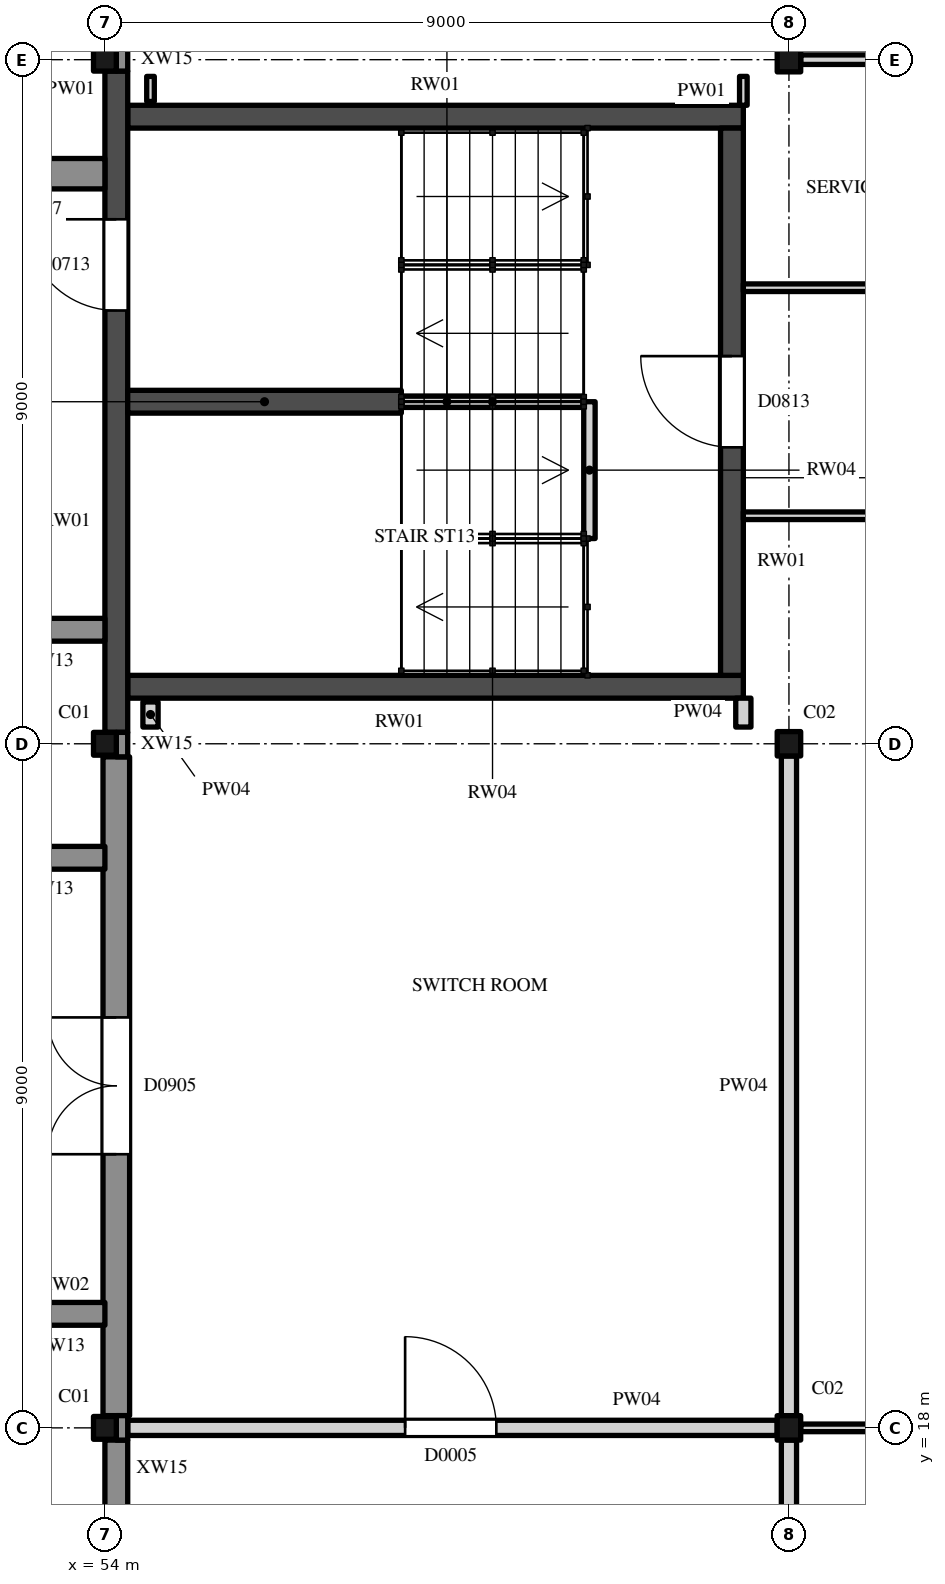
"""IFC4 building model, lengths in metres.
Left out: names, types, materials, properties, quantities, classifications, styles, units other than length and angle.
Written with IfcOpenShell. Run it as: python <this file> out.ifc"""

import sys

from ifc_helpers import new_model, si_unit, direction, frame, frame_2d, origin, origin_2d, place, context, subcontext, project, spatial, polyline, rectangle, hollow_rectangle, i_section, outline, extrude, element, fill, save


model = new_model("IFC4")
c1 = context("Model", 3, precision=1e-05, world=origin(), true_north=direction((0.0, 1.0)))
c2 = subcontext(c1, "Body", "Model", "MODEL_VIEW")
j1 = project(units=[si_unit("LENGTHUNIT", "METRE"), si_unit("PLANEANGLEUNIT", "RADIAN")], contexts=[c1])
p1 = place(None, origin())
s1 = spatial("IfcSite", under=j1, at=p1, CompositionType="ELEMENT")
p2 = place(p1, origin())
s2 = spatial("IfcBuilding", under=s1, at=p2, CompositionType="ELEMENT")
p3 = place(p2, origin())
s3 = spatial("IfcBuildingStorey", under=s2, at=p3, CompositionType="ELEMENT", Elevation=0.0)
p4 = place(p3, frame((54.0, 18.0, 0.0), z_axis=(0.0, 0.0, 1.0), x_axis=(1.0, 0.0, 0.0)))
e1 = element("IfcColumn", 1, at=p4, inside=s3, PredefinedType="COLUMN", context=c2, shape_type="SweptSolid", body=[
    extrude(hollow_rectangle(XDim=0.3, YDim=0.3, WallThickness=0.012, InnerFilletRadius=0.019, OuterFilletRadius=0.031, at=origin_2d()), origin(), (0.0, 0.0, 1.0), 6.0),
])
p5 = place(p3, frame((63.0, 18.0, 0.0), z_axis=(0.0, 0.0, 1.0), x_axis=(1.0, 0.0, 0.0)))
e2 = element("IfcColumn", 2, at=p5, inside=s3, PredefinedType="COLUMN", context=c2, shape_type="SweptSolid", body=[
    extrude(i_section(OverallWidth=0.309, OverallDepth=0.321, WebThickness=0.014, FlangeThickness=0.022, FilletRadius=0.017, at=origin_2d()), origin(), (0.0, 0.0, 1.0), 6.0),
])
p6 = place(p3, frame((54.0, 27.0, 0.0), z_axis=(0.0, 0.0, 1.0), x_axis=(1.0, 0.0, 0.0)))
e3 = element("IfcColumn", 3, at=p6, inside=s3, PredefinedType="COLUMN", context=c2, shape_type="SweptSolid", body=[
    extrude(hollow_rectangle(XDim=0.3, YDim=0.3, WallThickness=0.012, InnerFilletRadius=0.019, OuterFilletRadius=0.031, at=origin_2d()), origin(), (0.0, 0.0, 1.0), 6.0),
])
p7 = place(p3, frame((63.0, 27.0, 0.0), z_axis=(0.0, 0.0, 1.0), x_axis=(1.0, 0.0, 0.0)))
e4 = element("IfcColumn", 4, at=p7, inside=s3, PredefinedType="COLUMN", context=c2, shape_type="SweptSolid", body=[
    extrude(i_section(OverallWidth=0.309, OverallDepth=0.321, WebThickness=0.014, FlangeThickness=0.022, FilletRadius=0.017, at=origin_2d()), origin(), (0.0, 0.0, 1.0), 6.0),
])
p8 = place(p3, frame((54.0, 36.0, 0.0), z_axis=(0.0, 0.0, 1.0), x_axis=(1.0, 0.0, 0.0)))
e5 = element("IfcColumn", 5, at=p8, inside=s3, PredefinedType="COLUMN", context=c2, shape_type="SweptSolid", body=[
    extrude(hollow_rectangle(XDim=0.3, YDim=0.3, WallThickness=0.012, InnerFilletRadius=0.019, OuterFilletRadius=0.031, at=origin_2d()), origin(), (0.0, 0.0, 1.0), 6.0),
])
p9 = place(p3, frame((63.0, 36.0, 0.0), z_axis=(0.0, 0.0, 1.0), x_axis=(1.0, 0.0, 0.0)))
e6 = element("IfcColumn", 6, at=p9, inside=s3, PredefinedType="COLUMN", context=c2, shape_type="SweptSolid", body=[
    extrude(i_section(OverallWidth=0.309, OverallDepth=0.321, WebThickness=0.014, FlangeThickness=0.022, FilletRadius=0.017, at=origin_2d()), origin(), (0.0, 0.0, 1.0), 6.0),
])
for number, where, z_axis, x_axis in (
    (7, (54.3, 27.75, 0.0), (0.0, 0.0, 1.0), (1.0, 0.0, 0.0)),
    (8, (54.3, 35.25, 0.0), (0.0, 0.0, 1.0), (1.0, 0.0, 0.0)),
):
    element("IfcWall", number, at=place(p3, frame(where, z_axis=z_axis, x_axis=x_axis)), inside=s3, PredefinedType="SHEAR", context=c2, shape_type="SweptSolid", body=[
        extrude(rectangle(XDim=8.1, YDim=0.3, at=frame_2d((4.05, 0.0))), origin(), (0.0, 0.0, 1.0), 6.0),
    ])
p10 = place(p3, frame((54.15, 27.15, 0.0), z_axis=(0.0, 0.0, 1.0), x_axis=(0.0, 1.0, 0.0)))
e9 = element("IfcWall", 9, at=p10, inside=s3, PredefinedType="SHEAR", context=c2, shape_type="SweptSolid", body=[
    extrude(rectangle(XDim=8.7, YDim=0.3, at=frame_2d((4.35, 0.0))), origin(), (0.0, 0.0, 1.0), 6.0),
])
p11 = place(p10, frame((5.55, 0.0, 0.0)))
e10 = element("IfcOpeningElement", 10, at=p11, cuts=e9, PredefinedType="OPENING", context=c2, shape_type="SweptSolid", body=[
    extrude(rectangle(XDim=1.2, YDim=2.1, at=frame_2d((0.6, 1.05))), frame((0.0, 0.16, 0.0), z_axis=(0.0, -1.0, 0.0), x_axis=(1.0, 0.0, 0.0)), (0.0, 0.0, 1.0), 0.32),
])
p12 = place(p3, frame((62.25, 27.9, 0.0), z_axis=(0.0, 0.0, 1.0), x_axis=(0.0, 1.0, 0.0)))
e11 = element("IfcWall", 11, at=p12, inside=s3, PredefinedType="SHEAR", context=c2, shape_type="SweptSolid", body=[
    extrude(rectangle(XDim=7.2, YDim=0.3, at=frame_2d((3.6, 0.0))), origin(), (0.0, 0.0, 1.0), 6.0),
])
p13 = place(p12, frame((3.0, 0.0, 0.0)))
e12 = element("IfcOpeningElement", 12, at=p13, cuts=e11, PredefinedType="OPENING", context=c2, shape_type="SweptSolid", body=[
    extrude(rectangle(XDim=1.2, YDim=2.1, at=frame_2d((0.6, 1.05))), frame((0.0, 0.16, 0.0), z_axis=(0.0, -1.0, 0.0), x_axis=(1.0, 0.0, 0.0)), (0.0, 0.0, 1.0), 0.32),
])
p14 = place(p3, frame((57.9, 31.5, 0.0), z_axis=(0.0, 0.0, 1.0), x_axis=(-1.0, 0.0, 0.0)))
e13 = element("IfcWall", 13, at=p14, inside=s3, PredefinedType="SHEAR", context=c2, shape_type="SweptSolid", body=[
    extrude(rectangle(XDim=3.6, YDim=0.3, at=frame_2d((1.8, 0.0))), origin(), (0.0, 0.0, 1.0), 6.0),
])
p15 = place(p3, frame((60.375, 29.7, 0.0), z_axis=(0.0, 0.0, 1.0), x_axis=(0.0, 1.0, 0.0)))
e14 = element("IfcWall", 14, at=p15, inside=s3, PredefinedType="STANDARD", context=c2, shape_type="SweptSolid", body=[
    extrude(rectangle(XDim=1.8, YDim=0.15, at=frame_2d((0.9, 0.0))), origin(), (0.0, 0.0, 1.0), 2.8),
])
p16 = place(p3, frame((60.3, 31.5, 0.0), z_axis=(0.0, 0.0, 1.0), x_axis=(-1.0, 0.0, 0.0)))
e15 = element("IfcWall", 15, at=p16, inside=s3, PredefinedType="STANDARD", context=c2, shape_type="SweptSolid", body=[
    extrude(outline(polyline([(0.0, 0.0), (2.4, 0.0), (2.4, 1.5), (2.091, 1.5), (0.0, 2.662), (0.0, 0.0)])), frame((0.0, 0.075, 0.0), z_axis=(0.0, -1.0, 0.0), x_axis=(1.0, 0.0, 0.0)), (0.0, 0.0, 1.0), 0.15),
])
p17 = place(p3, frame((54.15, 9.172, 0.0), z_axis=(0.0, 0.0, 1.0), x_axis=(0.0, 1.0, 0.0)))
e16 = element("IfcWall", 16, at=p17, inside=s3, PredefinedType="SOLIDWALL", context=c2, shape_type="SweptSolid", body=[
    extrude(rectangle(XDim=8.667, YDim=0.3, at=frame_2d((4.333, 0.0))), origin(), (0.0, 0.0, 1.0), 5.292),
])
p18 = place(p17, frame((3.128, 0.0, 0.9)))
e17 = element("IfcOpeningElement", 17, at=p18, cuts=e16, PredefinedType="OPENING", context=c2, shape_type="SweptSolid", body=[
    extrude(rectangle(XDim=2.4, YDim=1.8, at=frame_2d((1.2, 0.9))), frame((0.0, 0.16, 0.0), z_axis=(0.0, -1.0, 0.0), x_axis=(1.0, 0.0, 0.0)), (0.0, 0.0, 1.0), 0.32),
])
p19 = place(p17, frame((0.928, 0.0, 0.0)))
e18 = element("IfcOpeningElement", 18, at=p19, cuts=e16, PredefinedType="OPENING", context=c2, shape_type="SweptSolid", body=[
    extrude(rectangle(XDim=1.8, YDim=2.4, at=frame_2d((0.9, 1.2))), frame((0.0, 0.16, 0.0), z_axis=(0.0, -1.0, 0.0), x_axis=(1.0, 0.0, 0.0)), (0.0, 0.0, 1.0), 0.32),
])
p20 = place(p3, frame((54.15, 18.161, 0.0), z_axis=(0.0, 0.0, 1.0), x_axis=(0.0, 1.0, 0.0)))
e19 = element("IfcWall", 19, at=p20, inside=s3, PredefinedType="SOLIDWALL", context=c2, shape_type="SweptSolid", body=[
    extrude(rectangle(XDim=8.667, YDim=0.35, at=frame_2d((4.333, 0.0))), origin(), (0.0, 0.0, 1.0), 5.292),
])
p21 = place(p20, frame((3.439, 0.0, 0.0)))
e20 = element("IfcOpeningElement", 20, at=p21, cuts=e19, PredefinedType="OPENING", context=c2, shape_type="SweptSolid", body=[
    extrude(rectangle(XDim=1.8, YDim=2.4, at=frame_2d((0.9, 1.2))), frame((0.0, 0.185, 0.0), z_axis=(0.0, -1.0, 0.0), x_axis=(1.0, 0.0, 0.0)), (0.0, 0.0, 1.0), 0.37),
])
p22 = place(p3, frame((54.225, 17.839, 0.0), z_axis=(0.0, 0.0, 1.0), x_axis=(0.0, 1.0, 0.0)))
e21 = element("IfcWall", 21, at=p22, inside=s3, PredefinedType="SOLIDWALL", context=c2, shape_type="SweptSolid", body=[
    extrude(rectangle(XDim=0.322, YDim=0.15, at=frame_2d((0.161, 0.0))), origin(), (0.0, 0.0, 1.0), 5.292),
])
for number, where, z_axis, x_axis in (
    (22, (54.225, 26.828, 0.0), (0.0, 0.0, 1.0), (0.0, 1.0, 0.0)),
    (23, (54.225, 35.85, 0.0), (0.0, 0.0, 1.0), (0.0, 1.0, 0.0)),
):
    element("IfcWall", number, at=place(p3, frame(where, z_axis=z_axis, x_axis=x_axis)), inside=s3, PredefinedType="SOLIDWALL", context=c2, shape_type="SweptSolid", body=[
        extrude(rectangle(XDim=0.322, YDim=0.15, at=frame_2d((0.161, 0.0))), origin(), (0.0, 0.0, 1.0), 6.0),
    ])
p23 = place(p3, frame((54.0, 19.5, 0.0), z_axis=(0.0, 0.0, 1.0), x_axis=(-1.0, 0.0, 0.0)))
e24 = element("IfcWall", 24, at=p23, inside=s3, PredefinedType="SOLIDWALL", context=c2, shape_type="SweptSolid", body=[
    extrude(outline(polyline([(0.0, 0.0), (1.2, 0.0), (1.2, 1.2), (0.0, 4.5), (0.0, 0.0)])), frame((0.0, 0.15, 0.0), z_axis=(0.0, -1.0, 0.0), x_axis=(1.0, 0.0, 0.0)), (0.0, 0.0, 1.0), 0.3),
])
p24 = place(p3, frame((54.0, 25.5, 0.0), z_axis=(0.0, 0.0, 1.0), x_axis=(-1.0, 0.0, 0.0)))
e25 = element("IfcWall", 25, at=p24, inside=s3, PredefinedType="SOLIDWALL", context=c2, shape_type="SweptSolid", body=[
    extrude(outline(polyline([(0.0, 0.0), (1.5, 0.0), (1.5, 1.2), (0.0, 5.0), (0.0, 0.0)])), frame((0.0, 0.15, 0.0), z_axis=(0.0, -1.0, 0.0), x_axis=(1.0, 0.0, 0.0)), (0.0, 0.0, 1.0), 0.3),
])
p25 = place(p3, frame((54.0, 28.5, 0.0), z_axis=(0.0, 0.0, 1.0), x_axis=(-1.0, 0.0, 0.0)))
e26 = element("IfcWall", 26, at=p25, inside=s3, PredefinedType="SOLIDWALL", context=c2, shape_type="SweptSolid", body=[
    extrude(outline(polyline([(0.0, 0.0), (1.5, 0.0), (1.5, 1.2), (0.0, 5.5), (0.0, 0.0)])), frame((0.0, 0.15, 0.0), z_axis=(0.0, -1.0, 0.0), x_axis=(1.0, 0.0, 0.0)), (0.0, 0.0, 1.0), 0.3),
])
p26 = place(p3, frame((54.0, 34.5, 0.0), z_axis=(0.0, 0.0, 1.0), x_axis=(-1.0, 0.0, 0.0)))
e27 = element("IfcWall", 27, at=p26, inside=s3, PredefinedType="SOLIDWALL", context=c2, shape_type="SweptSolid", body=[
    extrude(outline(polyline([(0.0, 0.0), (1.8, 0.0), (1.8, 1.2), (0.0, 6.0), (0.0, 0.0)])), frame((0.0, 0.2, 0.0), z_axis=(0.0, -1.0, 0.0), x_axis=(1.0, 0.0, 0.0)), (0.0, 0.0, 1.0), 0.4),
])
p27 = place(p3, frame((54.3, 18.0, 0.0), z_axis=(0.0, 0.0, 1.0), x_axis=(1.0, 0.0, 0.0)))
e28 = element("IfcWall", 28, at=p27, inside=s3, PredefinedType="PARTITIONING", context=c2, shape_type="SweptSolid", body=[
    extrude(rectangle(XDim=8.545, YDim=0.2, at=frame_2d((4.273, 0.0))), origin(), (0.0, 0.0, 1.0), 5.419),
])
p28 = place(p27, frame((3.65, 0.0, 0.0)))
e29 = element("IfcOpeningElement", 29, at=p28, cuts=e28, PredefinedType="OPENING", context=c2, shape_type="SweptSolid", body=[
    extrude(rectangle(XDim=1.2, YDim=2.4, at=frame_2d((0.6, 1.2))), frame((0.0, 0.11, 0.0), z_axis=(0.0, -1.0, 0.0), x_axis=(1.0, 0.0, 0.0)), (0.0, 0.0, 1.0), 0.22),
])
p29 = place(p3, frame((63.155, 18.0, 0.0), z_axis=(0.0, 0.0, 1.0), x_axis=(1.0, 0.0, 0.0)))
e30 = element("IfcWall", 30, at=p29, inside=s3, PredefinedType="PARTITIONING", context=c2, shape_type="SweptSolid", body=[
    extrude(rectangle(XDim=8.691, YDim=0.1, at=frame_2d((4.345, 0.0))), origin(), (0.0, 0.0, 1.0), 5.419),
])
p30 = place(p29, frame((3.15, 0.0, 0.0)))
e31 = element("IfcOpeningElement", 31, at=p30, cuts=e30, PredefinedType="OPENING", context=c2, shape_type="SweptSolid", body=[
    extrude(rectangle(XDim=2.4, YDim=3.0, at=frame_2d((1.2, 1.5))), frame((0.0, 0.06, 0.0), z_axis=(0.0, -1.0, 0.0), x_axis=(1.0, 0.0, 0.0)), (0.0, 0.0, 1.0), 0.12),
])
p31 = place(p3, frame((62.4, 30.0, 0.0), z_axis=(0.0, 0.0, 1.0), x_axis=(1.0, 0.0, 0.0)))
e32 = element("IfcWall", 32, at=p31, inside=s3, PredefinedType="PARTITIONING", context=c2, shape_type="SweptSolid", body=[
    extrude(rectangle(XDim=36.65, YDim=0.1, at=frame_2d((18.325, 0.0))), origin(), (0.0, 0.0, 1.0), 5.422),
])
p32 = place(p31, frame((3.95, 0.0, 0.0)))
e33 = element("IfcOpeningElement", 33, at=p32, cuts=e32, PredefinedType="OPENING", context=c2, shape_type="SweptSolid", body=[
    extrude(rectangle(XDim=2.4, YDim=3.0, at=frame_2d((1.2, 1.5))), frame((0.0, 0.06, 0.0), z_axis=(0.0, -1.0, 0.0), x_axis=(1.0, 0.0, 0.0)), (0.0, 0.0, 1.0), 0.12),
])
p33 = place(p31, frame((13.15, 0.0, 0.0)))
e34 = element("IfcOpeningElement", 34, at=p33, cuts=e32, PredefinedType="OPENING", context=c2, shape_type="SweptSolid", body=[
    extrude(rectangle(XDim=1.8, YDim=2.4, at=frame_2d((0.9, 1.2))), frame((0.0, 0.06, 0.0), z_axis=(0.0, -1.0, 0.0), x_axis=(1.0, 0.0, 0.0)), (0.0, 0.0, 1.0), 0.12),
])
p34 = place(p31, frame((22.15, 0.0, 0.0)))
e35 = element("IfcOpeningElement", 35, at=p34, cuts=e32, PredefinedType="OPENING", context=c2, shape_type="SweptSolid", body=[
    extrude(rectangle(XDim=1.8, YDim=2.4, at=frame_2d((0.9, 1.2))), frame((0.0, 0.06, 0.0), z_axis=(0.0, -1.0, 0.0), x_axis=(1.0, 0.0, 0.0)), (0.0, 0.0, 1.0), 0.12),
])
p35 = place(p31, frame((30.75, 0.0, 0.0)))
e36 = element("IfcOpeningElement", 36, at=p35, cuts=e32, PredefinedType="OPENING", context=c2, shape_type="SweptSolid", body=[
    extrude(rectangle(XDim=2.7, YDim=3.0, at=frame_2d((1.35, 1.5))), frame((0.0, 0.06, 0.0), z_axis=(0.0, -1.0, 0.0), x_axis=(1.0, 0.0, 0.0)), (0.0, 0.0, 1.0), 0.12),
])
p36 = place(p3, frame((62.4, 33.0, 0.0), z_axis=(0.0, 0.0, 1.0), x_axis=(1.0, 0.0, 0.0)))
e37 = element("IfcWall", 37, at=p36, inside=s3, PredefinedType="PARTITIONING", context=c2, shape_type="SweptSolid", body=[
    extrude(rectangle(XDim=9.65, YDim=0.1, at=frame_2d((4.825, 0.0))), origin(), (0.0, 0.0, 1.0), 5.422),
])
p37 = place(p36, frame((4.55, 0.0, 0.0)))
e38 = element("IfcOpeningElement", 38, at=p37, cuts=e37, PredefinedType="OPENING", context=c2, shape_type="SweptSolid", body=[
    extrude(rectangle(XDim=1.0, YDim=2.1, at=frame_2d((0.5, 1.05))), frame((0.0, 0.06, 0.0), z_axis=(0.0, -1.0, 0.0), x_axis=(1.0, 0.0, 0.0)), (0.0, 0.0, 1.0), 0.12),
])
p38 = place(p3, frame((63.155, 36.0, 0.0), z_axis=(0.0, 0.0, 1.0), x_axis=(1.0, 0.0, 0.0)))
e39 = element("IfcWall", 39, at=p38, inside=s3, PredefinedType="PARTITIONING", context=c2, shape_type="SweptSolid", body=[
    extrude(rectangle(XDim=8.691, YDim=0.125, at=frame_2d((4.345, 0.0))), origin(), (0.0, 0.0, 1.0), 5.419),
])
p39 = place(p3, frame((54.6, 27.22, 0.0), z_axis=(0.0, 0.0, 1.0), x_axis=(0.0, 1.0, 0.0)))
e40 = element("IfcWall", 40, at=p39, inside=s3, PredefinedType="PARTITIONING", context=c2, shape_type="SweptSolid", body=[
    extrude(rectangle(XDim=0.33, YDim=0.2, at=frame_2d((0.165, 0.0))), origin(), (0.0, 0.0, 1.0), 5.825),
])
p40 = place(p3, frame((54.6, 35.45, 0.0), z_axis=(0.0, 0.0, 1.0), x_axis=(0.0, 1.0, 0.0)))
e41 = element("IfcWall", 41, at=p40, inside=s3, PredefinedType="PARTITIONING", context=c2, shape_type="SweptSolid", body=[
    extrude(rectangle(XDim=0.33, YDim=0.1, at=frame_2d((0.165, 0.0))), origin(), (0.0, 0.0, 1.0), 5.825),
])
p41 = place(p3, frame((62.4, 27.22, 0.0), z_axis=(0.0, 0.0, 1.0), x_axis=(0.0, 1.0, 0.0)))
e42 = element("IfcWall", 42, at=p41, inside=s3, PredefinedType="PARTITIONING", context=c2, shape_type="SweptSolid", body=[
    extrude(rectangle(XDim=0.38, YDim=0.2, at=frame_2d((0.19, 0.0))), origin(), (0.0, 0.0, 1.0), 5.825),
])
p42 = place(p3, frame((62.4, 35.4, 0.0), z_axis=(0.0, 0.0, 1.0), x_axis=(0.0, 1.0, 0.0)))
e43 = element("IfcWall", 43, at=p42, inside=s3, PredefinedType="PARTITIONING", context=c2, shape_type="SweptSolid", body=[
    extrude(rectangle(XDim=0.38, YDim=0.1, at=frame_2d((0.19, 0.0))), origin(), (0.0, 0.0, 1.0), 5.825),
])
for number, where, z_axis, x_axis in (
    (44, (63.0, 9.16, 0.0), (0.0, 0.0, 1.0), (0.0, 1.0, 0.0)),
    (45, (63.0, 18.16, 0.0), (0.0, 0.0, 1.0), (0.0, 1.0, 0.0)),
):
    element("IfcWall", number, at=place(p3, frame(where, z_axis=z_axis, x_axis=x_axis)), inside=s3, PredefinedType="PARTITIONING", context=c2, shape_type="SweptSolid", body=[
        extrude(rectangle(XDim=8.679, YDim=0.2, at=frame_2d((4.34, 0.0))), origin(), (0.0, 0.0, 1.0), 5.292),
    ])
p43 = place(p13, origin())
e46 = element("IfcDoor", 46, at=p43, inside=s3, OperationType="SINGLE_SWING_LEFT", PredefinedType="DOOR", context=c2, shape_type="SweptSolid", body=[
    extrude(rectangle(XDim=1.2, YDim=2.1, at=frame_2d((0.6, 1.05))), frame((0.0, 0.025, 0.0), z_axis=(0.0, -1.0, 0.0), x_axis=(1.0, 0.0, 0.0)), (0.0, 0.0, 1.0), 0.05),
])
fill(e12, e46)
p44 = place(p11, origin())
e47 = element("IfcDoor", 47, at=p44, inside=s3, OperationType="SINGLE_SWING_LEFT", PredefinedType="DOOR", context=c2, shape_type="SweptSolid", body=[
    extrude(rectangle(XDim=1.2, YDim=2.1, at=frame_2d((0.6, 1.05))), frame((0.0, 0.025, 0.0), z_axis=(0.0, -1.0, 0.0), x_axis=(1.0, 0.0, 0.0)), (0.0, 0.0, 1.0), 0.05),
])
fill(e10, e47)
p45 = place(p21, origin())
e48 = element("IfcDoor", 48, at=p45, inside=s3, OperationType="DOUBLE_DOOR_SINGLE_SWING", PredefinedType="DOOR", context=c2, shape_type="SweptSolid", body=[
    extrude(rectangle(XDim=1.8, YDim=2.4, at=frame_2d((0.9, 1.2))), frame((0.0, 0.025, 0.0), z_axis=(0.0, -1.0, 0.0), x_axis=(1.0, 0.0, 0.0)), (0.0, 0.0, 1.0), 0.05),
])
fill(e20, e48)
p46 = place(p28, origin())
e49 = element("IfcDoor", 49, at=p46, inside=s3, OperationType="SINGLE_SWING_RIGHT", PredefinedType="DOOR", context=c2, shape_type="SweptSolid", body=[
    extrude(rectangle(XDim=1.2, YDim=2.4, at=frame_2d((0.6, 1.2))), frame((0.0, 0.025, 0.0), z_axis=(0.0, -1.0, 0.0), x_axis=(1.0, 0.0, 0.0)), (0.0, 0.0, 1.0), 0.05),
])
fill(e29, e49)
save(model, sys.argv[1])
